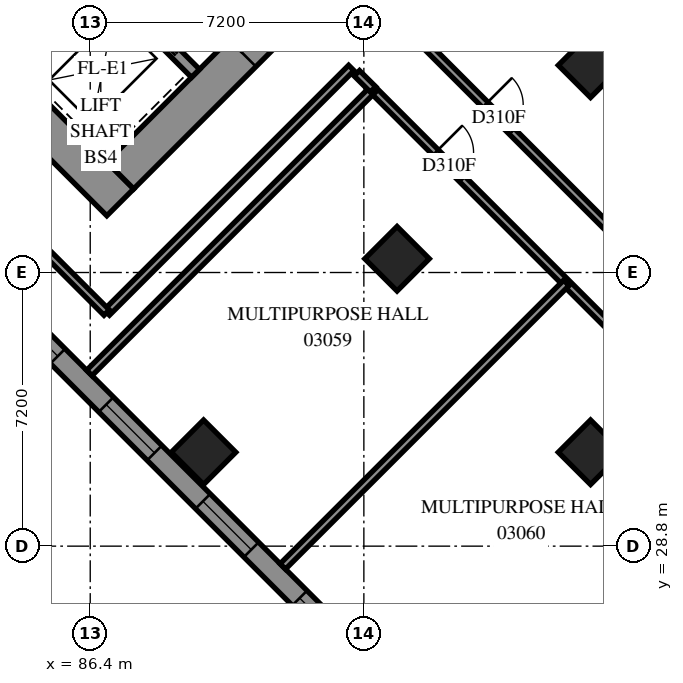
"""IFC4 building model, lengths in metres.
Left out: names, types, materials, properties, quantities, classifications, styles, units other than length and angle.
Written with IfcOpenShell. Run it as: python <this file> out.ifc"""

import sys

from ifc_helpers import new_model, si_unit, direction, frame, frame_2d, origin, origin_2d, place, context, subcontext, project, spatial, polyline, rectangle, outline, extrude, element, fill, save


model = new_model("IFC4")
c1 = context("Model", 3, precision=1e-05, world=origin(), true_north=direction((0.0, 1.0)))
c2 = subcontext(c1, "Body", "Model", "MODEL_VIEW")
j1 = project(units=[si_unit("LENGTHUNIT", "METRE"), si_unit("PLANEANGLEUNIT", "RADIAN")], contexts=[c1])
p1 = place(None, origin())
s1 = spatial("IfcSite", under=j1, at=p1, CompositionType="ELEMENT")
p2 = place(p1, origin())
s2 = spatial("IfcBuilding", under=s1, at=p2, CompositionType="ELEMENT")
p3 = place(p2, frame((0.0, 0.0, 14.4)))
s3 = spatial("IfcBuildingStorey", under=s2, at=p3, CompositionType="ELEMENT", Elevation=14.4)
for number, where, z_axis, x_axis in (
    (1, (99.565, 41.453, 0.0), (0.0, 0.0, 1.0), (0.707, -0.707, 0.0)),
    (2, (94.474, 36.362, 0.0), (0.0, 0.0, 1.0), (0.707, -0.707, 0.0)),
    (3, (89.382, 31.271, 0.0), (0.0, 0.0, 1.0), (0.707, -0.707, 0.0)),
    (4, (99.565, 31.271, 0.0), (0.0, 0.0, 1.0), (0.707, -0.707, 0.0)),
):
    element("IfcColumn", number, at=place(p3, frame(where, z_axis=z_axis, x_axis=x_axis)), inside=s3, PredefinedType="COLUMN", context=c2, shape_type="SweptSolid", body=[
        extrude(rectangle(XDim=1.2, YDim=1.2, at=origin_2d()), origin(), (0.0, 0.0, 1.0), 3.8),
    ])
p4 = place(p3, frame((75.594, 49.443, -0.4), z_axis=(0.0, 0.0, 1.0), x_axis=(0.7071037324, -0.70710983, 0.0)))
e5 = element("IfcWall", 5, at=p4, inside=s3, PredefinedType="SHEAR", context=c2, shape_type="SweptSolid", body=[
    extrude(rectangle(XDim=16.4, YDim=1.0, at=frame_2d((8.2, 0.0))), origin(), (0.0, 0.0, 1.0), 3.5),
])
p5 = place(p3, frame((87.19, 38.554, -0.4), z_axis=(0.0, 0.0, 1.0), x_axis=(0.707103309, 0.7071102534, 0.0)))
e6 = element("IfcWall", 6, at=p5, inside=s3, PredefinedType="SHEAR", context=c2, shape_type="SweptSolid", body=[
    extrude(rectangle(XDim=14.4, YDim=1.0, at=frame_2d((7.2, 0.0))), origin(), (0.0, 0.0, 1.0), 3.5),
])
p6 = place(p5, frame((4.55, 0.0, 0.4)))
e7 = element("IfcOpeningElement", 7, at=p6, cuts=e6, PredefinedType="OPENING", context=c2, shape_type="SweptSolid", body=[
    extrude(rectangle(XDim=1.1, YDim=2.1, at=frame_2d((0.55, 1.05))), frame((0.0, 0.51, 0.0), z_axis=(0.0, -1.0, 0.0), x_axis=(1.0, 0.0, 0.0)), (0.0, 0.0, 1.0), 1.02),
])
p7 = place(p5, frame((11.35, 0.0, 0.4)))
e8 = element("IfcOpeningElement", 8, at=p7, cuts=e6, PredefinedType="OPENING", context=c2, shape_type="SweptSolid", body=[
    extrude(rectangle(XDim=1.1, YDim=2.1, at=frame_2d((0.55, 1.05))), frame((0.0, 0.51, 0.0), z_axis=(0.0, -1.0, 0.0), x_axis=(1.0, 0.0, 0.0)), (0.0, 0.0, 1.0), 1.02),
])
p8 = place(p3, frame((84.291, 41.453, 0.0), z_axis=(0.0, 0.0, 1.0), x_axis=(0.7071067812, 0.7071067812, 0.0)))
e9 = element("IfcWall", 9, at=p8, inside=s3, PredefinedType="SOLIDWALL", context=c2, shape_type="SweptSolid", body=[
    extrude(rectangle(XDim=3.3, YDim=0.3, at=frame_2d((1.65, 0.0))), origin(), (0.0, 0.0, 1.0), 3.8),
])
p9 = place(p3, frame((78.988, 51.423, 0.0), z_axis=(0.0, 0.0, 1.0), x_axis=(0.7071067812, -0.7071067812, 0.0)))
e10 = element("IfcWall", 10, at=p9, inside=s3, PredefinedType="SOLIDWALL", context=c2, shape_type="SweptSolid", body=[
    extrude(rectangle(XDim=14.4, YDim=0.3, at=frame_2d((7.2, 0.0))), origin(), (0.0, 0.0, 1.0), 3.8),
])
p10 = place(p9, frame((1.25, 0.0, 0.0)))
e11 = element("IfcOpeningElement", 11, at=p10, cuts=e10, PredefinedType="OPENING", context=c2, shape_type="SweptSolid", body=[
    extrude(rectangle(XDim=1.1, YDim=2.1, at=frame_2d((0.55, 1.05))), frame((0.0, 0.16, 0.0), z_axis=(0.0, -1.0, 0.0), x_axis=(1.0, 0.0, 0.0)), (0.0, 0.0, 1.0), 0.32),
])
p11 = place(p9, frame((4.85, 0.0, 0.0)))
e12 = element("IfcOpeningElement", 12, at=p11, cuts=e10, PredefinedType="OPENING", context=c2, shape_type="SweptSolid", body=[
    extrude(rectangle(XDim=1.1, YDim=2.1, at=frame_2d((0.55, 1.05))), frame((0.0, 0.16, 0.0), z_axis=(0.0, -1.0, 0.0), x_axis=(1.0, 0.0, 0.0)), (0.0, 0.0, 1.0), 0.32),
])
p12 = place(p9, frame((8.45, 0.0, 0.0)))
e13 = element("IfcOpeningElement", 13, at=p12, cuts=e10, PredefinedType="OPENING", context=c2, shape_type="SweptSolid", body=[
    extrude(rectangle(XDim=1.1, YDim=2.1, at=frame_2d((0.55, 1.05))), frame((0.0, 0.16, 0.0), z_axis=(0.0, -1.0, 0.0), x_axis=(1.0, 0.0, 0.0)), (0.0, 0.0, 1.0), 0.32),
])
p13 = place(p9, frame((12.05, 0.0, 0.0)))
e14 = element("IfcOpeningElement", 14, at=p13, cuts=e10, PredefinedType="OPENING", context=c2, shape_type="SweptSolid", body=[
    extrude(rectangle(XDim=1.1, YDim=2.1, at=frame_2d((0.55, 1.05))), frame((0.0, 0.16, 0.0), z_axis=(0.0, -1.0, 0.0), x_axis=(1.0, 0.0, 0.0)), (0.0, 0.0, 1.0), 0.32),
])
p14 = place(p3, frame((117.843, 34.665, 0.0), z_axis=(0.0, 0.0, 1.0), x_axis=(-0.7071067812, 0.7071067812, 0.0)))
e15 = element("IfcWall", 15, at=p14, inside=s3, PredefinedType="SOLIDWALL", context=c2, shape_type="SweptSolid", body=[
    extrude(outline(polyline([(-0.275, -0.275), (54.222, -0.275), (53.994, 0.275), (0.275, 0.275), (-0.275, -0.275)])), origin(), (0.0, 0.0, 1.0), 3.8),
])
p15 = place(p14, frame((0.8, 0.0, 0.7)))
e16 = element("IfcOpeningElement", 16, at=p15, cuts=e15, PredefinedType="OPENING", context=c2, shape_type="SweptSolid", body=[
    extrude(rectangle(XDim=1.8, YDim=2.6, at=frame_2d((0.9, 1.3))), frame((0.0, 0.285, 0.0), z_axis=(0.0, -1.0, 0.0), x_axis=(1.0, 0.0, 0.0)), (0.0, 0.0, 1.0), 0.57),
])
p16 = place(p14, frame((4.225, 0.0, 0.7)))
e17 = element("IfcOpeningElement", 17, at=p16, cuts=e15, PredefinedType="OPENING", context=c2, shape_type="SweptSolid", body=[
    extrude(rectangle(XDim=1.8, YDim=2.6, at=frame_2d((0.9, 1.3))), frame((0.0, 0.285, 0.0), z_axis=(0.0, -1.0, 0.0), x_axis=(1.0, 0.0, 0.0)), (0.0, 0.0, 1.0), 0.57),
])
p17 = place(p14, frame((7.825, 0.0, 0.7)))
e18 = element("IfcOpeningElement", 18, at=p17, cuts=e15, PredefinedType="OPENING", context=c2, shape_type="SweptSolid", body=[
    extrude(rectangle(XDim=1.8, YDim=2.6, at=frame_2d((0.9, 1.3))), frame((0.0, 0.285, 0.0), z_axis=(0.0, -1.0, 0.0), x_axis=(1.0, 0.0, 0.0)), (0.0, 0.0, 1.0), 0.57),
])
p18 = place(p14, frame((11.425, 0.0, 0.7)))
e19 = element("IfcOpeningElement", 19, at=p18, cuts=e15, PredefinedType="OPENING", context=c2, shape_type="SweptSolid", body=[
    extrude(rectangle(XDim=1.8, YDim=2.6, at=frame_2d((0.9, 1.3))), frame((0.0, 0.285, 0.0), z_axis=(0.0, -1.0, 0.0), x_axis=(1.0, 0.0, 0.0)), (0.0, 0.0, 1.0), 0.57),
])
p19 = place(p14, frame((15.025, 0.0, 0.7)))
e20 = element("IfcOpeningElement", 20, at=p19, cuts=e15, PredefinedType="OPENING", context=c2, shape_type="SweptSolid", body=[
    extrude(rectangle(XDim=1.8, YDim=2.6, at=frame_2d((0.9, 1.3))), frame((0.0, 0.285, 0.0), z_axis=(0.0, -1.0, 0.0), x_axis=(1.0, 0.0, 0.0)), (0.0, 0.0, 1.0), 0.57),
])
p20 = place(p14, frame((18.625, 0.0, 0.7)))
e21 = element("IfcOpeningElement", 21, at=p20, cuts=e15, PredefinedType="OPENING", context=c2, shape_type="SweptSolid", body=[
    extrude(rectangle(XDim=1.8, YDim=2.6, at=frame_2d((0.9, 1.3))), frame((0.0, 0.285, 0.0), z_axis=(0.0, -1.0, 0.0), x_axis=(1.0, 0.0, 0.0)), (0.0, 0.0, 1.0), 0.57),
])
p21 = place(p14, frame((22.225, 0.0, 0.7)))
e22 = element("IfcOpeningElement", 22, at=p21, cuts=e15, PredefinedType="OPENING", context=c2, shape_type="SweptSolid", body=[
    extrude(rectangle(XDim=1.8, YDim=2.6, at=frame_2d((0.9, 1.3))), frame((0.0, 0.285, 0.0), z_axis=(0.0, -1.0, 0.0), x_axis=(1.0, 0.0, 0.0)), (0.0, 0.0, 1.0), 0.57),
])
p22 = place(p14, frame((25.825, 0.0, 0.7)))
e23 = element("IfcOpeningElement", 23, at=p22, cuts=e15, PredefinedType="OPENING", context=c2, shape_type="SweptSolid", body=[
    extrude(rectangle(XDim=1.8, YDim=2.6, at=frame_2d((0.9, 1.3))), frame((0.0, 0.285, 0.0), z_axis=(0.0, -1.0, 0.0), x_axis=(1.0, 0.0, 0.0)), (0.0, 0.0, 1.0), 0.57),
])
p23 = place(p14, frame((29.425, 0.0, 0.7)))
e24 = element("IfcOpeningElement", 24, at=p23, cuts=e15, PredefinedType="OPENING", context=c2, shape_type="SweptSolid", body=[
    extrude(rectangle(XDim=1.8, YDim=2.6, at=frame_2d((0.9, 1.3))), frame((0.0, 0.285, 0.0), z_axis=(0.0, -1.0, 0.0), x_axis=(1.0, 0.0, 0.0)), (0.0, 0.0, 1.0), 0.57),
])
p24 = place(p14, frame((33.025, 0.0, 0.7)))
e25 = element("IfcOpeningElement", 25, at=p24, cuts=e15, PredefinedType="OPENING", context=c2, shape_type="SweptSolid", body=[
    extrude(rectangle(XDim=1.8, YDim=2.6, at=frame_2d((0.9, 1.3))), frame((0.0, 0.285, 0.0), z_axis=(0.0, -1.0, 0.0), x_axis=(1.0, 0.0, 0.0)), (0.0, 0.0, 1.0), 0.57),
])
p25 = place(p14, frame((36.625, 0.0, 0.7)))
e26 = element("IfcOpeningElement", 26, at=p25, cuts=e15, PredefinedType="OPENING", context=c2, shape_type="SweptSolid", body=[
    extrude(rectangle(XDim=1.8, YDim=2.6, at=frame_2d((0.9, 1.3))), frame((0.0, 0.285, 0.0), z_axis=(0.0, -1.0, 0.0), x_axis=(1.0, 0.0, 0.0)), (0.0, 0.0, 1.0), 0.57),
])
p26 = place(p14, frame((40.225, 0.0, 0.7)))
e27 = element("IfcOpeningElement", 27, at=p26, cuts=e15, PredefinedType="OPENING", context=c2, shape_type="SweptSolid", body=[
    extrude(rectangle(XDim=1.8, YDim=2.6, at=frame_2d((0.9, 1.3))), frame((0.0, 0.285, 0.0), z_axis=(0.0, -1.0, 0.0), x_axis=(1.0, 0.0, 0.0)), (0.0, 0.0, 1.0), 0.57),
])
p27 = place(p14, frame((43.825, 0.0, 0.7)))
e28 = element("IfcOpeningElement", 28, at=p27, cuts=e15, PredefinedType="OPENING", context=c2, shape_type="SweptSolid", body=[
    extrude(rectangle(XDim=1.8, YDim=2.6, at=frame_2d((0.9, 1.3))), frame((0.0, 0.285, 0.0), z_axis=(0.0, -1.0, 0.0), x_axis=(1.0, 0.0, 0.0)), (0.0, 0.0, 1.0), 0.57),
])
p28 = place(p14, frame((47.425, 0.0, 0.7)))
e29 = element("IfcOpeningElement", 29, at=p28, cuts=e15, PredefinedType="OPENING", context=c2, shape_type="SweptSolid", body=[
    extrude(rectangle(XDim=1.8, YDim=2.6, at=frame_2d((0.9, 1.3))), frame((0.0, 0.285, 0.0), z_axis=(0.0, -1.0, 0.0), x_axis=(1.0, 0.0, 0.0)), (0.0, 0.0, 1.0), 0.57),
])
p29 = place(p14, frame((51.06, 0.0, 0.7)))
e30 = element("IfcOpeningElement", 30, at=p29, cuts=e15, PredefinedType="OPENING", context=c2, shape_type="SweptSolid", body=[
    extrude(rectangle(XDim=1.8, YDim=2.6, at=frame_2d((0.9, 1.3))), frame((0.0, 0.285, 0.0), z_axis=(0.0, -1.0, 0.0), x_axis=(1.0, 0.0, 0.0)), (0.0, 0.0, 1.0), 0.57),
])
p30 = place(p3, frame((77.07, 42.275, 0.0), z_axis=(0.0, 0.0, 1.0), x_axis=(0.7071067812, -0.7071067812, 0.0)))
e31 = element("IfcWall", 31, at=p30, inside=s3, PredefinedType="SOLIDWALL", context=c2, shape_type="SweptSolid", body=[
    extrude(outline(polyline([(0.114, -0.275), (39.288, -0.275), (38.737, 0.275), (-0.114, 0.275), (0.114, -0.275)])), origin(), (0.0, 0.0, 1.0), 3.8),
])
p31 = place(p30, frame((2.837, 0.0, 0.7)))
e32 = element("IfcOpeningElement", 32, at=p31, cuts=e31, PredefinedType="OPENING", context=c2, shape_type="SweptSolid", body=[
    extrude(rectangle(XDim=1.8, YDim=2.6, at=frame_2d((0.9, 1.3))), frame((0.0, 0.285, 0.0), z_axis=(0.0, -1.0, 0.0), x_axis=(1.0, 0.0, 0.0)), (0.0, 0.0, 1.0), 0.57),
])
p32 = place(p30, frame((6.588, 0.0, 0.7)))
e33 = element("IfcOpeningElement", 33, at=p32, cuts=e31, PredefinedType="OPENING", context=c2, shape_type="SweptSolid", body=[
    extrude(rectangle(XDim=1.8, YDim=2.6, at=frame_2d((0.9, 1.3))), frame((0.0, 0.285, 0.0), z_axis=(0.0, -1.0, 0.0), x_axis=(1.0, 0.0, 0.0)), (0.0, 0.0, 1.0), 0.57),
])
p33 = place(p30, frame((10.188, 0.0, 0.7)))
e34 = element("IfcOpeningElement", 34, at=p33, cuts=e31, PredefinedType="OPENING", context=c2, shape_type="SweptSolid", body=[
    extrude(rectangle(XDim=1.8, YDim=2.6, at=frame_2d((0.9, 1.3))), frame((0.0, 0.285, 0.0), z_axis=(0.0, -1.0, 0.0), x_axis=(1.0, 0.0, 0.0)), (0.0, 0.0, 1.0), 0.57),
])
p34 = place(p30, frame((13.787, 0.0, 0.7)))
e35 = element("IfcOpeningElement", 35, at=p34, cuts=e31, PredefinedType="OPENING", context=c2, shape_type="SweptSolid", body=[
    extrude(rectangle(XDim=1.8, YDim=2.6, at=frame_2d((0.9, 1.3))), frame((0.0, 0.285, 0.0), z_axis=(0.0, -1.0, 0.0), x_axis=(1.0, 0.0, 0.0)), (0.0, 0.0, 1.0), 0.57),
])
p35 = place(p30, frame((17.387, 0.0, 0.7)))
e36 = element("IfcOpeningElement", 36, at=p35, cuts=e31, PredefinedType="OPENING", context=c2, shape_type="SweptSolid", body=[
    extrude(rectangle(XDim=1.8, YDim=2.6, at=frame_2d((0.9, 1.3))), frame((0.0, 0.285, 0.0), z_axis=(0.0, -1.0, 0.0), x_axis=(1.0, 0.0, 0.0)), (0.0, 0.0, 1.0), 0.57),
])
p36 = place(p30, frame((20.988, 0.0, 0.7)))
e37 = element("IfcOpeningElement", 37, at=p36, cuts=e31, PredefinedType="OPENING", context=c2, shape_type="SweptSolid", body=[
    extrude(rectangle(XDim=1.8, YDim=2.6, at=frame_2d((0.9, 1.3))), frame((0.0, 0.285, 0.0), z_axis=(0.0, -1.0, 0.0), x_axis=(1.0, 0.0, 0.0)), (0.0, 0.0, 1.0), 0.57),
])
p37 = place(p30, frame((24.587, 0.0, 0.7)))
e38 = element("IfcOpeningElement", 38, at=p37, cuts=e31, PredefinedType="OPENING", context=c2, shape_type="SweptSolid", body=[
    extrude(rectangle(XDim=1.8, YDim=2.6, at=frame_2d((0.9, 1.3))), frame((0.0, 0.285, 0.0), z_axis=(0.0, -1.0, 0.0), x_axis=(1.0, 0.0, 0.0)), (0.0, 0.0, 1.0), 0.57),
])
p38 = place(p30, frame((28.188, 0.0, 0.7)))
e39 = element("IfcOpeningElement", 39, at=p38, cuts=e31, PredefinedType="OPENING", context=c2, shape_type="SweptSolid", body=[
    extrude(rectangle(XDim=1.8, YDim=2.6, at=frame_2d((0.9, 1.3))), frame((0.0, 0.285, 0.0), z_axis=(0.0, -1.0, 0.0), x_axis=(1.0, 0.0, 0.0)), (0.0, 0.0, 1.0), 0.57),
])
p39 = place(p30, frame((31.788, 0.0, 0.7)))
e40 = element("IfcOpeningElement", 40, at=p39, cuts=e31, PredefinedType="OPENING", context=c2, shape_type="SweptSolid", body=[
    extrude(rectangle(XDim=1.8, YDim=2.6, at=frame_2d((0.9, 1.3))), frame((0.0, 0.285, 0.0), z_axis=(0.0, -1.0, 0.0), x_axis=(1.0, 0.0, 0.0)), (0.0, 0.0, 1.0), 0.57),
])
p40 = place(p30, frame((35.388, 0.0, 0.7)))
e41 = element("IfcOpeningElement", 41, at=p40, cuts=e31, PredefinedType="OPENING", context=c2, shape_type="SweptSolid", body=[
    extrude(rectangle(XDim=1.8, YDim=2.6, at=frame_2d((0.9, 1.3))), frame((0.0, 0.285, 0.0), z_axis=(0.0, -1.0, 0.0), x_axis=(1.0, 0.0, 0.0)), (0.0, 0.0, 1.0), 0.57),
])
p41 = place(p3, frame((93.835, 40.813, 0.0), z_axis=(0.0, 0.0, 1.0), x_axis=(0.7071067812, -0.7071067812, 0.0)))
e42 = element("IfcWall", 42, at=p41, inside=s3, PredefinedType="PARTITIONING", context=c2, shape_type="SweptSolid", body=[
    extrude(rectangle(XDim=25.198, YDim=0.2, at=frame_2d((12.599, 0.0))), origin(), (0.0, 0.0, 1.0), 3.8),
])
p42 = place(p41, frame((2.337, 0.0, 0.0)))
e43 = element("IfcOpeningElement", 43, at=p42, cuts=e42, PredefinedType="OPENING", context=c2, shape_type="SweptSolid", body=[
    extrude(rectangle(XDim=1.0, YDim=2.1, at=frame_2d((0.5, 1.05))), frame((0.0, 0.11, 0.0), z_axis=(0.0, -1.0, 0.0), x_axis=(1.0, 0.0, 0.0)), (0.0, 0.0, 1.0), 0.22),
])
p43 = place(p41, frame((9.537, 0.0, 0.0)))
e44 = element("IfcOpeningElement", 44, at=p43, cuts=e42, PredefinedType="OPENING", context=c2, shape_type="SweptSolid", body=[
    extrude(rectangle(XDim=1.0, YDim=2.1, at=frame_2d((0.5, 1.05))), frame((0.0, 0.11, 0.0), z_axis=(0.0, -1.0, 0.0), x_axis=(1.0, 0.0, 0.0)), (0.0, 0.0, 1.0), 0.22),
])
p44 = place(p41, frame((14.966, 0.0, 0.0)))
e45 = element("IfcOpeningElement", 45, at=p44, cuts=e42, PredefinedType="OPENING", context=c2, shape_type="SweptSolid", body=[
    extrude(rectangle(XDim=1.0, YDim=2.1, at=frame_2d((0.5, 1.05))), frame((0.0, 0.11, 0.0), z_axis=(0.0, -1.0, 0.0), x_axis=(1.0, 0.0, 0.0)), (0.0, 0.0, 1.0), 0.22),
])
p45 = place(p41, frame((21.861, 0.0, 0.0)))
e46 = element("IfcOpeningElement", 46, at=p45, cuts=e42, PredefinedType="OPENING", context=c2, shape_type="SweptSolid", body=[
    extrude(rectangle(XDim=1.0, YDim=2.1, at=frame_2d((0.5, 1.05))), frame((0.0, 0.11, 0.0), z_axis=(0.0, -1.0, 0.0), x_axis=(1.0, 0.0, 0.0)), (0.0, 0.0, 1.0), 0.22),
])
p46 = place(p3, frame((94.689, 42.517, 0.0), z_axis=(0.0, 0.0, 1.0), x_axis=(0.7071067812, -0.7071067812, 0.0)))
e47 = element("IfcWall", 47, at=p46, inside=s3, PredefinedType="PARTITIONING", context=c2, shape_type="SweptSolid", body=[
    extrude(rectangle(XDim=22.2, YDim=0.2, at=frame_2d((11.1, 0.0))), origin(), (0.0, 0.0, 1.0), 3.8),
])
p47 = place(p46, frame((2.974, 0.0, 0.0)))
e48 = element("IfcOpeningElement", 48, at=p47, cuts=e47, PredefinedType="OPENING", context=c2, shape_type="SweptSolid", body=[
    extrude(rectangle(XDim=1.0, YDim=2.1, at=frame_2d((0.5, 1.05))), frame((0.0, 0.11, 0.0), z_axis=(0.0, -1.0, 0.0), x_axis=(1.0, 0.0, 0.0)), (0.0, 0.0, 1.0), 0.22),
])
p48 = place(p46, frame((10.174, 0.0, 0.0)))
e49 = element("IfcOpeningElement", 49, at=p48, cuts=e47, PredefinedType="OPENING", context=c2, shape_type="SweptSolid", body=[
    extrude(rectangle(XDim=1.0, YDim=2.1, at=frame_2d((0.5, 1.05))), frame((0.0, 0.11, 0.0), z_axis=(0.0, -1.0, 0.0), x_axis=(1.0, 0.0, 0.0)), (0.0, 0.0, 1.0), 0.22),
])
p49 = place(p46, frame((17.374, 0.0, 0.0)))
e50 = element("IfcOpeningElement", 50, at=p49, cuts=e47, PredefinedType="OPENING", context=c2, shape_type="SweptSolid", body=[
    extrude(rectangle(XDim=1.0, YDim=2.1, at=frame_2d((0.5, 1.05))), frame((0.0, 0.11, 0.0), z_axis=(0.0, -1.0, 0.0), x_axis=(1.0, 0.0, 0.0)), (0.0, 0.0, 1.0), 0.22),
])
for number, where, z_axis, x_axis in (
    (51, (86.376, 33.357, 0.0), (0.0, 0.0, 1.0), (0.707, 0.707, 0.0)),
    (52, (96.559, 23.175, 0.0), (0.0, 0.0, 1.0), (0.707, 0.707, 0.0)),
    (53, (91.468, 28.266, 0.0), (0.0, 0.0, 1.0), (0.707, 0.707, 0.0)),
):
    element("IfcWall", number, at=place(p3, frame(where, z_axis=z_axis, x_axis=x_axis)), inside=s3, PredefinedType="PARTITIONING", context=c2, shape_type="SweptSolid", body=[
        extrude(rectangle(XDim=10.55, YDim=0.2, at=frame_2d((5.275, 0.0))), origin(), (0.0, 0.0, 1.0), 3.8),
    ])
p50 = place(p3, frame((86.836, 34.948, 0.0), z_axis=(0.0, 0.0, 1.0), x_axis=(0.7071067812, 0.7071067812, 0.0)))
e54 = element("IfcWall", 54, at=p50, inside=s3, PredefinedType="PARTITIONING", context=c2, shape_type="SweptSolid", body=[
    extrude(rectangle(XDim=9.099, YDim=0.2, at=frame_2d((4.55, 0.0))), origin(), (0.0, 0.0, 1.0), 3.8),
])
p51 = place(p3, frame((84.889, 36.889, 0.0), z_axis=(0.0, 0.0, 1.0), x_axis=(0.7071067812, -0.7071067812, 0.0)))
e55 = element("IfcWall", 55, at=p51, inside=s3, PredefinedType="PARTITIONING", context=c2, shape_type="SweptSolid", body=[
    extrude(rectangle(XDim=2.749, YDim=0.2, at=frame_2d((1.375, 0.0))), origin(), (0.0, 0.0, 1.0), 3.8),
])
p52 = place(p3, frame((93.415, 41.243, 0.0), z_axis=(0.0, 0.0, 1.0), x_axis=(0.7087685999, -0.7054410477, 0.0)))
e56 = element("IfcWall", 56, at=p52, inside=s3, PredefinedType="PARTITIONING", context=c2, shape_type="SweptSolid", body=[
    extrude(rectangle(XDim=0.601, YDim=0.2, at=frame_2d((0.3, 0.0))), origin(), (0.0, 0.0, 1.0), 3.8),
])
p53 = place(p33, origin())
e57 = element("IfcWindow", 57, at=p53, inside=s3, PartitioningType="SINGLE_PANEL", PredefinedType="WINDOW", context=c2, shape_type="SweptSolid", body=[
    extrude(rectangle(XDim=1.8, YDim=2.6, at=frame_2d((0.9, 1.3))), frame((0.0, 0.155, 0.0), z_axis=(0.0, -1.0, 0.0), x_axis=(1.0, 0.0, 0.0)), (0.0, 0.0, 1.0), 0.06),
])
fill(e34, e57)
p54 = place(p34, origin())
e58 = element("IfcWindow", 58, at=p54, inside=s3, PartitioningType="SINGLE_PANEL", PredefinedType="WINDOW", context=c2, shape_type="SweptSolid", body=[
    extrude(rectangle(XDim=1.8, YDim=2.6, at=frame_2d((0.9, 1.3))), frame((0.0, 0.155, 0.0), z_axis=(0.0, -1.0, 0.0), x_axis=(1.0, 0.0, 0.0)), (0.0, 0.0, 1.0), 0.06),
])
fill(e35, e58)
p55 = place(p35, origin())
e59 = element("IfcWindow", 59, at=p55, inside=s3, PartitioningType="SINGLE_PANEL", PredefinedType="WINDOW", context=c2, shape_type="SweptSolid", body=[
    extrude(rectangle(XDim=1.8, YDim=2.6, at=frame_2d((0.9, 1.3))), frame((0.0, 0.155, 0.0), z_axis=(0.0, -1.0, 0.0), x_axis=(1.0, 0.0, 0.0)), (0.0, 0.0, 1.0), 0.06),
])
fill(e36, e59)
p56 = place(p36, origin())
e60 = element("IfcWindow", 60, at=p56, inside=s3, PartitioningType="SINGLE_PANEL", PredefinedType="WINDOW", context=c2, shape_type="SweptSolid", body=[
    extrude(rectangle(XDim=1.8, YDim=2.6, at=frame_2d((0.9, 1.3))), frame((0.0, 0.155, 0.0), z_axis=(0.0, -1.0, 0.0), x_axis=(1.0, 0.0, 0.0)), (0.0, 0.0, 1.0), 0.06),
])
fill(e37, e60)
p57 = place(p6, origin())
e61 = element("IfcDoor", 61, at=p57, inside=s3, OperationType="DOUBLE_DOOR_SINGLE_SWING", PredefinedType="DOOR", context=c2, shape_type="SweptSolid", body=[
    extrude(rectangle(XDim=1.1, YDim=2.1, at=frame_2d((0.55, 1.05))), frame((0.0, 0.025, 0.0), z_axis=(0.0, -1.0, 0.0), x_axis=(1.0, 0.0, 0.0)), (0.0, 0.0, 1.0), 0.05),
])
fill(e7, e61)
p58 = place(p47, origin())
e62 = element("IfcDoor", 62, at=p58, inside=s3, OperationType="SINGLE_SWING_RIGHT", PredefinedType="DOOR", context=c2, shape_type="SweptSolid", body=[
    extrude(rectangle(XDim=1.0, YDim=2.1, at=frame_2d((0.5, 1.05))), frame((0.0, 0.025, 0.0), z_axis=(0.0, -1.0, 0.0), x_axis=(1.0, 0.0, 0.0)), (0.0, 0.0, 1.0), 0.05),
])
fill(e48, e62)
p59 = place(p42, origin())
e63 = element("IfcDoor", 63, at=p59, inside=s3, OperationType="SINGLE_SWING_LEFT", PredefinedType="DOOR", context=c2, shape_type="SweptSolid", body=[
    extrude(rectangle(XDim=1.0, YDim=2.1, at=frame_2d((0.5, 1.05))), frame((0.0, 0.025, 0.0), z_axis=(0.0, -1.0, 0.0), x_axis=(1.0, 0.0, 0.0)), (0.0, 0.0, 1.0), 0.05),
])
fill(e43, e63)
save(model, sys.argv[1])
